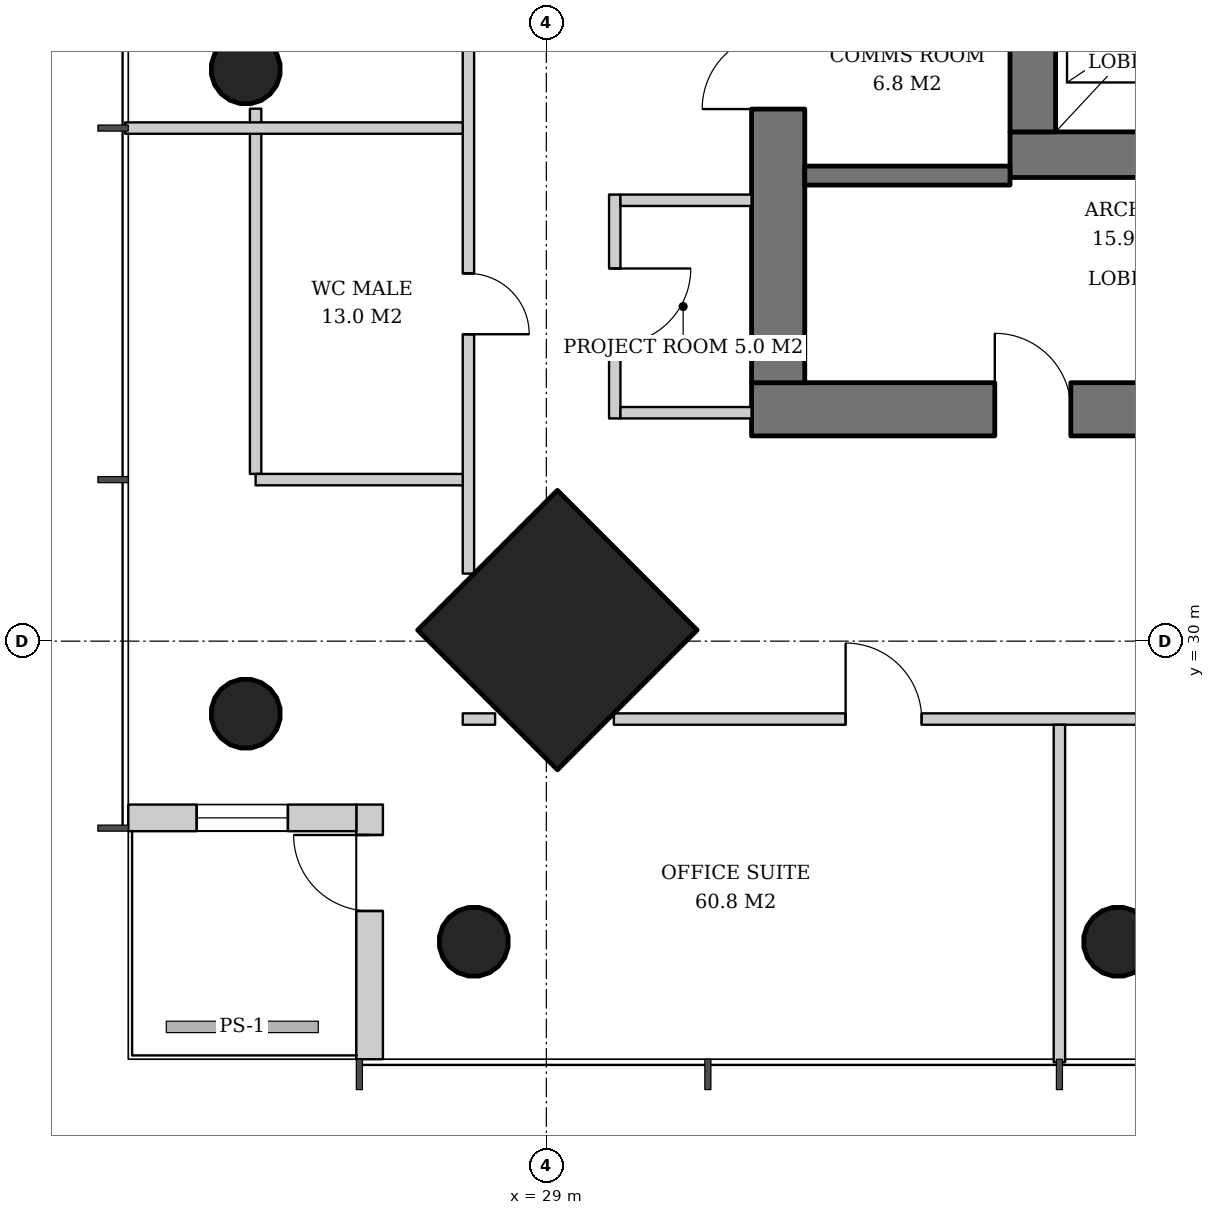
"""IFC4 building model, lengths in metres.
Left out: names, types, materials, properties, quantities, classifications, styles, units other than length and angle.
Written with IfcOpenShell. Run it as: python <this file> out.ifc"""

import sys

from ifc_helpers import new_model, si_unit, direction, frame, frame_2d, origin, origin_2d, place, context, subcontext, project, spatial, rectangle, hollow_circle, extrude, element, fill, save


model = new_model("IFC4")
c1 = context("Model", 3, precision=1e-05, world=origin(), true_north=direction((0.0, 1.0)))
c2 = subcontext(c1, "Body", "Model", "MODEL_VIEW")
j1 = project(units=[si_unit("LENGTHUNIT", "METRE"), si_unit("PLANEANGLEUNIT", "RADIAN")], contexts=[c1])
p1 = place(None, origin())
s1 = spatial("IfcSite", under=j1, at=p1, CompositionType="ELEMENT")
p2 = place(p1, origin())
s2 = spatial("IfcBuilding", under=s1, at=p2, CompositionType="ELEMENT")
p3 = place(p2, frame((0.0, 0.0, 146.4)))
s3 = spatial("IfcBuildingStorey", under=s2, at=p3, CompositionType="ELEMENT", Elevation=146.4)
p4 = place(p3, frame((29.107, 30.107, 0.0), z_axis=(0.031898107953, 0.031898107953, 0.998981992539), x_axis=(-0.707106781187, 0.707106781187, 0.0)))
e1 = element("IfcColumn", 1, at=p4, inside=s3, PredefinedType="COLUMN", context=c2, shape_type="SweptSolid", body=[
    extrude(rectangle(XDim=2.6, YDim=2.6, at=origin_2d()), origin(), (0.0, 0.0, 1.0), 3.804),
])
p5 = place(p3, frame((25.007, 29.007, 0.0), z_axis=(0.031962158256, 0.031962158256, 0.998977898093), x_axis=(-0.707106781187, 0.707106781187, 0.0)))
e2 = element("IfcColumn", 2, at=p5, inside=s3, PredefinedType="COLUMN", context=c2, shape_type="SweptSolid", body=[
    extrude(hollow_circle(Radius=0.457, WallThickness=0.03, at=origin_2d()), origin(), (0.0, 0.0, 1.0), 3.804),
])
p6 = place(p3, frame((25.007, 37.504, 0.0), z_axis=(0.031974442509, 0.015923015547, 0.999361842679), x_axis=(-0.445775033553, 0.895145027055, 0.0)))
e3 = element("IfcColumn", 3, at=p6, inside=s3, PredefinedType="COLUMN", context=c2, shape_type="SweptSolid", body=[
    extrude(hollow_circle(Radius=0.457, WallThickness=0.03, at=origin_2d()), origin(), (0.0, 0.0, 1.0), 3.802),
])
p7 = place(p3, frame((28.007, 26.007, 0.0), z_axis=(0.031962158256, 0.031962158256, 0.998977898093), x_axis=(-0.707106781187, 0.707106781187, 0.0)))
e4 = element("IfcColumn", 4, at=p7, inside=s3, PredefinedType="COLUMN", context=c2, shape_type="SweptSolid", body=[
    extrude(hollow_circle(Radius=0.457, WallThickness=0.03, at=origin_2d()), origin(), (0.0, 0.0, 1.0), 3.804),
])
p8 = place(p3, frame((36.504, 26.007, 0.0), z_axis=(0.015923015547, 0.031974442509, 0.999361842679), x_axis=(-0.895145027055, 0.445775033553, 0.0)))
e5 = element("IfcColumn", 5, at=p8, inside=s3, PredefinedType="COLUMN", context=c2, shape_type="SweptSolid", body=[
    extrude(hollow_circle(Radius=0.457, WallThickness=0.03, at=origin_2d()), origin(), (0.0, 0.0, 1.0), 3.802),
])
p9 = place(p3, frame((35.1, 36.4, 0.0), z_axis=(0.0, 0.0, 1.0), x_axis=(1.0, 0.0, 0.0)))
e6 = element("IfcWall", 6, at=p9, inside=s3, PredefinedType="SHEAR", context=c2, shape_type="SweptSolid", body=[
    extrude(rectangle(XDim=19.8, YDim=0.6, at=frame_2d((9.9, 0.0))), origin(), (0.0, 0.0, 1.0), 3.8),
])
p10 = place(p9, frame((3.9, 0.0, 0.0)))
e7 = element("IfcOpeningElement", 7, at=p10, cuts=e6, PredefinedType="OPENING", context=c2, shape_type="SweptSolid", body=[
    extrude(rectangle(XDim=1.0, YDim=2.1, at=frame_2d((0.5, 1.05))), frame((0.0, 0.31, 0.0), z_axis=(0.0, -1.0, 0.0), x_axis=(1.0, 0.0, 0.0)), (0.0, 0.0, 1.0), 0.62),
])
p11 = place(p9, frame((15.35, 0.0, 0.0)))
e8 = element("IfcOpeningElement", 8, at=p11, cuts=e6, PredefinedType="OPENING", context=c2, shape_type="SweptSolid", body=[
    extrude(rectangle(XDim=1.0, YDim=2.1, at=frame_2d((0.5, 1.05))), frame((0.0, 0.31, 0.0), z_axis=(0.0, -1.0, 0.0), x_axis=(1.0, 0.0, 0.0)), (0.0, 0.0, 1.0), 0.62),
])
p12 = place(p3, frame((35.4, 36.7, 0.0), z_axis=(0.0, 0.0, 1.0), x_axis=(0.0, 1.0, 0.0)))
e9 = element("IfcWall", 9, at=p12, inside=s3, PredefinedType="SHEAR", context=c2, shape_type="SweptSolid", body=[
    extrude(rectangle(XDim=18.6, YDim=0.6, at=frame_2d((9.3, 0.0))), origin(), (0.0, 0.0, 1.0), 3.8),
])
p13 = place(p12, frame((8.4, 0.0, 0.0)))
e10 = element("IfcOpeningElement", 10, at=p13, cuts=e9, PredefinedType="OPENING", context=c2, shape_type="SweptSolid", body=[
    extrude(rectangle(XDim=1.8, YDim=2.4, at=frame_2d((0.9, 1.2))), frame((0.0, 0.31, 0.0), z_axis=(0.0, -1.0, 0.0), x_axis=(1.0, 0.0, 0.0)), (0.0, 0.0, 1.0), 0.62),
])
p14 = place(p3, frame((31.7, 33.05, 0.0), z_axis=(0.0, 0.0, 1.0), x_axis=(1.0, 0.0, 0.0)))
e11 = element("IfcWall", 11, at=p14, inside=s3, PredefinedType="SHEAR", context=c2, shape_type="SweptSolid", body=[
    extrude(rectangle(XDim=26.6, YDim=0.7, at=frame_2d((13.3, 0.0))), origin(), (0.0, 0.0, 1.0), 3.8),
])
p15 = place(p14, frame((7.3, 0.0, 0.0)))
e12 = element("IfcOpeningElement", 12, at=p15, cuts=e11, PredefinedType="OPENING", context=c2, shape_type="SweptSolid", body=[
    extrude(rectangle(XDim=1.0, YDim=2.1, at=frame_2d((0.5, 1.05))), frame((0.0, 0.36, 0.0), z_axis=(0.0, -1.0, 0.0), x_axis=(1.0, 0.0, 0.0)), (0.0, 0.0, 1.0), 0.72),
])
p16 = place(p14, frame((18.75, 0.0, 0.0)))
e13 = element("IfcOpeningElement", 13, at=p16, cuts=e11, PredefinedType="OPENING", context=c2, shape_type="SweptSolid", body=[
    extrude(rectangle(XDim=1.0, YDim=2.1, at=frame_2d((0.5, 1.05))), frame((0.0, 0.36, 0.0), z_axis=(0.0, -1.0, 0.0), x_axis=(1.0, 0.0, 0.0)), (0.0, 0.0, 1.0), 0.72),
])
p17 = place(p14, frame((3.2, 0.0, 0.0)))
e14 = element("IfcOpeningElement", 14, at=p17, cuts=e11, PredefinedType="OPENING", context=c2, shape_type="SweptSolid", body=[
    extrude(rectangle(XDim=1.0, YDim=2.1, at=frame_2d((0.5, 1.05))), frame((0.0, 0.36, 0.0), z_axis=(0.0, -1.0, 0.0), x_axis=(1.0, 0.0, 0.0)), (0.0, 0.0, 1.0), 0.72),
])
p18 = place(p14, frame((10.42, 0.0, 0.0)))
e15 = element("IfcOpeningElement", 15, at=p18, cuts=e11, PredefinedType="OPENING", context=c2, shape_type="SweptSolid", body=[
    extrude(rectangle(XDim=1.0, YDim=2.1, at=frame_2d((0.5, 1.05))), frame((0.0, 0.36, 0.0), z_axis=(0.0, -1.0, 0.0), x_axis=(1.0, 0.0, 0.0)), (0.0, 0.0, 1.0), 0.72),
])
p19 = place(p14, frame((14.46, 0.0, 0.0)))
e16 = element("IfcOpeningElement", 16, at=p19, cuts=e11, PredefinedType="OPENING", context=c2, shape_type="SweptSolid", body=[
    extrude(rectangle(XDim=1.0, YDim=2.1, at=frame_2d((0.5, 1.05))), frame((0.0, 0.36, 0.0), z_axis=(0.0, -1.0, 0.0), x_axis=(1.0, 0.0, 0.0)), (0.0, 0.0, 1.0), 0.72),
])
p20 = place(p14, frame((22.5, 0.0, 0.0)))
e17 = element("IfcOpeningElement", 17, at=p20, cuts=e11, PredefinedType="OPENING", context=c2, shape_type="SweptSolid", body=[
    extrude(rectangle(XDim=1.0, YDim=2.1, at=frame_2d((0.5, 1.05))), frame((0.0, 0.36, 0.0), z_axis=(0.0, -1.0, 0.0), x_axis=(1.0, 0.0, 0.0)), (0.0, 0.0, 1.0), 0.72),
])
p21 = place(p3, frame((32.05, 33.4, 0.0), z_axis=(0.0, 0.0, 1.0), x_axis=(0.0, 1.0, 0.0)))
e18 = element("IfcWall", 18, at=p21, inside=s3, PredefinedType="SHEAR", context=c2, shape_type="SweptSolid", body=[
    extrude(rectangle(XDim=25.2, YDim=0.7, at=frame_2d((12.6, 0.0))), origin(), (0.0, 0.0, 1.0), 3.8),
])
p22 = place(p21, frame((11.7, 0.0, 0.0)))
e19 = element("IfcOpeningElement", 19, at=p22, cuts=e18, PredefinedType="OPENING", context=c2, shape_type="SweptSolid", body=[
    extrude(rectangle(XDim=1.8, YDim=2.4, at=frame_2d((0.9, 1.2))), frame((0.0, 0.36, 0.0), z_axis=(0.0, -1.0, 0.0), x_axis=(1.0, 0.0, 0.0)), (0.0, 0.0, 1.0), 0.72),
])
p23 = place(p21, frame((3.6, 0.0, 0.0)))
e20 = element("IfcOpeningElement", 20, at=p23, cuts=e18, PredefinedType="OPENING", context=c2, shape_type="SweptSolid", body=[
    extrude(rectangle(XDim=1.0, YDim=2.1, at=frame_2d((0.5, 1.05))), frame((0.0, 0.36, 0.0), z_axis=(0.0, -1.0, 0.0), x_axis=(1.0, 0.0, 0.0)), (0.0, 0.0, 1.0), 0.72),
])
p24 = place(p21, frame((6.35, 0.0, 0.0)))
e21 = element("IfcOpeningElement", 21, at=p24, cuts=e18, PredefinedType="OPENING", context=c2, shape_type="SweptSolid", body=[
    extrude(rectangle(XDim=1.0, YDim=2.1, at=frame_2d((0.5, 1.05))), frame((0.0, 0.36, 0.0), z_axis=(0.0, -1.0, 0.0), x_axis=(1.0, 0.0, 0.0)), (0.0, 0.0, 1.0), 0.72),
])
p25 = place(p21, frame((9.1, 0.0, 0.0)))
e22 = element("IfcOpeningElement", 22, at=p25, cuts=e18, PredefinedType="OPENING", context=c2, shape_type="SweptSolid", body=[
    extrude(rectangle(XDim=1.0, YDim=2.1, at=frame_2d((0.5, 1.05))), frame((0.0, 0.36, 0.0), z_axis=(0.0, -1.0, 0.0), x_axis=(1.0, 0.0, 0.0)), (0.0, 0.0, 1.0), 0.72),
])
p26 = place(p21, frame((15.1, 0.0, 0.0)))
e23 = element("IfcOpeningElement", 23, at=p26, cuts=e18, PredefinedType="OPENING", context=c2, shape_type="SweptSolid", body=[
    extrude(rectangle(XDim=1.0, YDim=2.1, at=frame_2d((0.5, 1.05))), frame((0.0, 0.36, 0.0), z_axis=(0.0, -1.0, 0.0), x_axis=(1.0, 0.0, 0.0)), (0.0, 0.0, 1.0), 0.72),
])
p27 = place(p21, frame((17.85, 0.0, 0.0)))
e24 = element("IfcOpeningElement", 24, at=p27, cuts=e18, PredefinedType="OPENING", context=c2, shape_type="SweptSolid", body=[
    extrude(rectangle(XDim=1.0, YDim=2.1, at=frame_2d((0.5, 1.05))), frame((0.0, 0.36, 0.0), z_axis=(0.0, -1.0, 0.0), x_axis=(1.0, 0.0, 0.0)), (0.0, 0.0, 1.0), 0.72),
])
p28 = place(p3, frame((26.675, 24.5, 0.0), z_axis=(0.0, 0.0, 1.0), x_axis=(0.0, 1.0, 0.0)))
e25 = element("IfcWall", 25, at=p28, inside=s3, PredefinedType="SOLIDWALL", context=c2, shape_type="SweptSolid", body=[
    extrude(rectangle(XDim=3.35, YDim=0.35, at=frame_2d((1.675, 0.0))), origin(), (0.0, 0.0, 1.0), 3.62),
])
p29 = place(p28, frame((1.95, 0.0, 0.0)))
e26 = element("IfcOpeningElement", 26, at=p29, cuts=e25, PredefinedType="OPENING", context=c2, shape_type="SweptSolid", body=[
    extrude(rectangle(XDim=1.0, YDim=2.4, at=frame_2d((0.5, 1.2))), frame((0.0, 0.185, 0.0), z_axis=(0.0, -1.0, 0.0), x_axis=(1.0, 0.0, 0.0)), (0.0, 0.0, 1.0), 0.37),
])
p30 = place(p3, frame((26.5, 27.675, 0.0), z_axis=(0.0, 0.0, 1.0), x_axis=(-1.0, 0.0, 0.0)))
e27 = element("IfcWall", 27, at=p30, inside=s3, PredefinedType="SOLIDWALL", context=c2, shape_type="SweptSolid", body=[
    extrude(rectangle(XDim=3.0, YDim=0.35, at=frame_2d((1.5, 0.0))), origin(), (0.0, 0.0, 1.0), 3.62),
])
p31 = place(p30, frame((0.9, 0.0, 0.6)))
e28 = element("IfcOpeningElement", 28, at=p31, cuts=e27, PredefinedType="OPENING", context=c2, shape_type="SweptSolid", body=[
    extrude(rectangle(XDim=1.2, YDim=2.55, at=frame_2d((0.6, 1.275))), frame((0.0, 0.185, 0.0), z_axis=(0.0, -1.0, 0.0), x_axis=(1.0, 0.0, 0.0)), (0.0, 0.0, 1.0), 0.37),
])
p32 = place(p3, frame((32.4, 36.125, 0.0), z_axis=(0.0, 0.0, 1.0), x_axis=(1.0, 0.0, 0.0)))
e29 = element("IfcWall", 29, at=p32, inside=s3, PredefinedType="SHEAR", context=c2, shape_type="SweptSolid", body=[
    extrude(rectangle(XDim=2.7, YDim=0.25, at=frame_2d((1.35, 0.0))), origin(), (0.0, 0.0, 1.0), 3.8),
])
p33 = place(p3, frame((29.9, 35.875, 0.0), z_axis=(0.0, 0.0, 1.0), x_axis=(0.0, -1.0, 0.0)))
e30 = element("IfcWall", 30, at=p33, inside=s3, PredefinedType="PARTITIONING", context=c2, shape_type="SweptSolid", body=[
    extrude(rectangle(XDim=2.945, YDim=0.15, at=frame_2d((1.473, 0.0))), origin(), (0.0, 0.0, 1.0), 2.806),
])
p34 = place(p33, frame((0.972, 0.0, 0.0)))
e31 = element("IfcOpeningElement", 31, at=p34, cuts=e30, PredefinedType="OPENING", context=c2, shape_type="SweptSolid", body=[
    extrude(rectangle(XDim=1.0, YDim=2.1, at=frame_2d((0.5, 1.05))), frame((0.0, 0.085, 0.0), z_axis=(0.0, -1.0, 0.0), x_axis=(1.0, 0.0, 0.0)), (0.0, 0.0, 1.0), 0.17),
])
for number, where, z_axis, x_axis in (
    (32, (31.7, 35.8, 0.0), (0.0, 0.0, 1.0), (-1.0, 0.0, 0.0)),
    (33, (31.7, 33.005, 0.0), (0.0, 0.0, 1.0), (-1.0, 0.0, 0.0)),
):
    element("IfcWall", number, at=place(p3, frame(where, z_axis=z_axis, x_axis=x_axis)), inside=s3, PredefinedType="PARTITIONING", context=c2, shape_type="SweptSolid", body=[
        extrude(rectangle(XDim=1.725, YDim=0.15, at=frame_2d((0.862, 0.0))), origin(), (0.0, 0.0, 1.0), 3.62),
    ])
p35 = place(p3, frame((25.175, 37.005, 0.0), z_axis=(0.0, 0.0, 1.0), x_axis=(0.0, -1.0, 0.0)))
e34 = element("IfcWall", 34, at=p35, inside=s3, PredefinedType="PARTITIONING", context=c2, shape_type="SweptSolid", body=[
    extrude(rectangle(XDim=4.805, YDim=0.15, at=frame_2d((2.402, 0.0))), origin(), (0.0, 0.0, 1.0), 2.806),
])
p36 = place(p3, frame((27.975, 61.112, 0.0), z_axis=(0.0, 0.0, 1.0), x_axis=(0.0, -1.0, 0.0)))
e35 = element("IfcWall", 35, at=p36, inside=s3, PredefinedType="PARTITIONING", context=c2, shape_type="SweptSolid", body=[
    extrude(rectangle(XDim=30.223, YDim=0.15, at=frame_2d((15.112, 0.0))), origin(), (0.0, 0.0, 1.0), 2.72),
])
p37 = place(p36, frame((3.049, 0.0, 0.0)))
e36 = element("IfcOpeningElement", 36, at=p37, cuts=e35, PredefinedType="OPENING", context=c2, shape_type="SweptSolid", body=[
    extrude(rectangle(XDim=1.0, YDim=2.1, at=frame_2d((0.5, 1.05))), frame((0.0, 0.085, 0.0), z_axis=(0.0, -1.0, 0.0), x_axis=(1.0, 0.0, 0.0)), (0.0, 0.0, 1.0), 0.17),
])
p38 = place(p36, frame((7.674, 0.0, 0.0)))
e37 = element("IfcOpeningElement", 37, at=p38, cuts=e35, PredefinedType="OPENING", context=c2, shape_type="SweptSolid", body=[
    extrude(rectangle(XDim=1.0, YDim=2.1, at=frame_2d((0.5, 1.05))), frame((0.0, 0.085, 0.0), z_axis=(0.0, -1.0, 0.0), x_axis=(1.0, 0.0, 0.0)), (0.0, 0.0, 1.0), 0.17),
])
p39 = place(p36, frame((12.299, 0.0, 0.0)))
e38 = element("IfcOpeningElement", 38, at=p39, cuts=e35, PredefinedType="OPENING", context=c2, shape_type="SweptSolid", body=[
    extrude(rectangle(XDim=1.0, YDim=2.1, at=frame_2d((0.5, 1.05))), frame((0.0, 0.085, 0.0), z_axis=(0.0, -1.0, 0.0), x_axis=(1.0, 0.0, 0.0)), (0.0, 0.0, 1.0), 0.17),
])
p40 = place(p36, frame((17.024, 0.0, 0.0)))
e39 = element("IfcOpeningElement", 39, at=p40, cuts=e35, PredefinedType="OPENING", context=c2, shape_type="SweptSolid", body=[
    extrude(rectangle(XDim=0.8, YDim=2.1, at=frame_2d((0.4, 1.05))), frame((0.0, 0.085, 0.0), z_axis=(0.0, -1.0, 0.0), x_axis=(1.0, 0.0, 0.0)), (0.0, 0.0, 1.0), 0.17),
])
p41 = place(p36, frame((21.549, 0.0, 0.0)))
e40 = element("IfcOpeningElement", 40, at=p41, cuts=e35, PredefinedType="OPENING", context=c2, shape_type="SweptSolid", body=[
    extrude(rectangle(XDim=1.0, YDim=2.1, at=frame_2d((0.5, 1.05))), frame((0.0, 0.085, 0.0), z_axis=(0.0, -1.0, 0.0), x_axis=(1.0, 0.0, 0.0)), (0.0, 0.0, 1.0), 0.17),
])
p42 = place(p36, frame((26.274, 0.0, 0.0)))
e41 = element("IfcOpeningElement", 41, at=p42, cuts=e35, PredefinedType="OPENING", context=c2, shape_type="SweptSolid", body=[
    extrude(rectangle(XDim=0.8, YDim=2.1, at=frame_2d((0.4, 1.05))), frame((0.0, 0.085, 0.0), z_axis=(0.0, -1.0, 0.0), x_axis=(1.0, 0.0, 0.0)), (0.0, 0.0, 1.0), 0.17),
])
p43 = place(p3, frame((27.9, 36.75, 0.0), z_axis=(0.0, 0.0, 1.0), x_axis=(-1.0, 0.0, 0.0)))
e42 = element("IfcWall", 42, at=p43, inside=s3, PredefinedType="PARTITIONING", context=c2, shape_type="SweptSolid", body=[
    extrude(rectangle(XDim=4.44, YDim=0.15, at=frame_2d((2.22, 0.0))), origin(), (0.0, 0.0, 1.0), 2.82),
])
p44 = place(p3, frame((27.9, 32.125, 0.0), z_axis=(0.0, 0.0, 1.0), x_axis=(-1.0, 0.0, 0.0)))
e43 = element("IfcWall", 43, at=p44, inside=s3, PredefinedType="PARTITIONING", context=c2, shape_type="SweptSolid", body=[
    extrude(rectangle(XDim=2.725, YDim=0.15, at=frame_2d((1.362, 0.0))), origin(), (0.0, 0.0, 1.0), 2.82),
])
p45 = place(p3, frame((27.9, 28.975, 0.0), z_axis=(0.0, 0.0, 1.0), x_axis=(1.0, 0.0, 0.0)))
e44 = element("IfcWall", 44, at=p45, inside=s3, PredefinedType="PARTITIONING", context=c2, shape_type="SweptSolid", body=[
    extrude(rectangle(XDim=0.426, YDim=0.15, at=frame_2d((0.213, 0.0))), origin(), (0.0, 0.0, 1.0), 3.32),
])
p46 = place(p3, frame((29.888, 28.975, 0.0), z_axis=(0.0, 0.0, 1.0), x_axis=(1.0, 0.0, 0.0)))
e45 = element("IfcWall", 45, at=p46, inside=s3, PredefinedType="PARTITIONING", context=c2, shape_type="SweptSolid", body=[
    extrude(rectangle(XDim=30.223, YDim=0.15, at=frame_2d((15.112, 0.0))), origin(), (0.0, 0.0, 1.0), 2.72),
])
p47 = place(p46, frame((3.049, 0.0, 0.0)))
e46 = element("IfcOpeningElement", 46, at=p47, cuts=e45, PredefinedType="OPENING", context=c2, shape_type="SweptSolid", body=[
    extrude(rectangle(XDim=1.0, YDim=2.1, at=frame_2d((0.5, 1.05))), frame((0.0, 0.085, 0.0), z_axis=(0.0, -1.0, 0.0), x_axis=(1.0, 0.0, 0.0)), (0.0, 0.0, 1.0), 0.17),
])
p48 = place(p46, frame((7.674, 0.0, 0.0)))
e47 = element("IfcOpeningElement", 47, at=p48, cuts=e45, PredefinedType="OPENING", context=c2, shape_type="SweptSolid", body=[
    extrude(rectangle(XDim=1.0, YDim=2.1, at=frame_2d((0.5, 1.05))), frame((0.0, 0.085, 0.0), z_axis=(0.0, -1.0, 0.0), x_axis=(1.0, 0.0, 0.0)), (0.0, 0.0, 1.0), 0.17),
])
p49 = place(p46, frame((16.924, 0.0, 0.0)))
e48 = element("IfcOpeningElement", 48, at=p49, cuts=e45, PredefinedType="OPENING", context=c2, shape_type="SweptSolid", body=[
    extrude(rectangle(XDim=1.0, YDim=2.1, at=frame_2d((0.5, 1.05))), frame((0.0, 0.085, 0.0), z_axis=(0.0, -1.0, 0.0), x_axis=(1.0, 0.0, 0.0)), (0.0, 0.0, 1.0), 0.17),
])
p50 = place(p46, frame((26.174, 0.0, 0.0)))
e49 = element("IfcOpeningElement", 49, at=p50, cuts=e45, PredefinedType="OPENING", context=c2, shape_type="SweptSolid", body=[
    extrude(rectangle(XDim=1.0, YDim=2.1, at=frame_2d((0.5, 1.05))), frame((0.0, 0.085, 0.0), z_axis=(0.0, -1.0, 0.0), x_axis=(1.0, 0.0, 0.0)), (0.0, 0.0, 1.0), 0.17),
])
p51 = place(p3, frame((35.75, 28.9, 0.0), z_axis=(0.0, 0.0, 1.0), x_axis=(0.0, -1.0, 0.0)))
e50 = element("IfcWall", 50, at=p51, inside=s3, PredefinedType="PARTITIONING", context=c2, shape_type="SweptSolid", body=[
    extrude(rectangle(XDim=4.44, YDim=0.15, at=frame_2d((2.22, 0.0))), origin(), (0.0, 0.0, 1.0), 2.82),
])
p52 = place(p29, origin())
e51 = element("IfcDoor", 51, at=p52, inside=s3, OperationType="SINGLE_SWING_RIGHT", PredefinedType="DOOR", context=c2, shape_type="SweptSolid", body=[
    extrude(rectangle(XDim=1.0, YDim=2.4, at=frame_2d((0.5, 1.2))), frame((0.0, 0.025, 0.0), z_axis=(0.0, -1.0, 0.0), x_axis=(1.0, 0.0, 0.0)), (0.0, 0.0, 1.0), 0.05),
])
fill(e26, e51)
p53 = place(p31, origin())
e52 = element("IfcWindow", 52, at=p53, inside=s3, PartitioningType="SINGLE_PANEL", PredefinedType="WINDOW", context=c2, shape_type="SweptSolid", body=[
    extrude(rectangle(XDim=1.2, YDim=2.55, at=frame_2d((0.6, 1.275))), frame((0.0, 0.03, 0.0), z_axis=(0.0, -1.0, 0.0), x_axis=(1.0, 0.0, 0.0)), (0.0, 0.0, 1.0), 0.06),
])
fill(e28, e52)
p54 = place(p23, origin())
e53 = element("IfcDoor", 53, at=p54, inside=s3, OperationType="SINGLE_SWING_LEFT", PredefinedType="DOOR", context=c2, shape_type="SweptSolid", body=[
    extrude(rectangle(XDim=1.0, YDim=2.1, at=frame_2d((0.5, 1.05))), frame((0.0, -0.29, 0.0), z_axis=(0.0, -1.0, 0.0), x_axis=(1.0, 0.0, 0.0)), (0.0, 0.0, 1.0), 0.05),
])
fill(e20, e53)
p55 = place(p17, origin())
e54 = element("IfcDoor", 54, at=p55, inside=s3, OperationType="SINGLE_SWING_LEFT", PredefinedType="DOOR", context=c2, shape_type="SweptSolid", body=[
    extrude(rectangle(XDim=1.0, YDim=2.1, at=frame_2d((0.5, 1.05))), frame((0.0, 0.34, 0.0), z_axis=(0.0, -1.0, 0.0), x_axis=(1.0, 0.0, 0.0)), (0.0, 0.0, 1.0), 0.05),
])
fill(e14, e54)
p56 = place(p34, origin())
e55 = element("IfcDoor", 55, at=p56, inside=s3, OperationType="SINGLE_SWING_LEFT", PredefinedType="DOOR", context=c2, shape_type="SweptSolid", body=[
    extrude(rectangle(XDim=1.0, YDim=2.1, at=frame_2d((0.5, 1.05))), frame((0.0, 0.025, 0.0), z_axis=(0.0, -1.0, 0.0), x_axis=(1.0, 0.0, 0.0)), (0.0, 0.0, 1.0), 0.05),
])
fill(e31, e55)
p57 = place(p42, origin())
e56 = element("IfcDoor", 56, at=p57, inside=s3, OperationType="SINGLE_SWING_RIGHT", PredefinedType="DOOR", context=c2, shape_type="SweptSolid", body=[
    extrude(rectangle(XDim=0.8, YDim=2.1, at=frame_2d((0.4, 1.05))), frame((0.0, 0.025, 0.0), z_axis=(0.0, -1.0, 0.0), x_axis=(1.0, 0.0, 0.0)), (0.0, 0.0, 1.0), 0.05),
])
fill(e41, e56)
p58 = place(p47, origin())
e57 = element("IfcDoor", 57, at=p58, inside=s3, OperationType="SINGLE_SWING_LEFT", PredefinedType="DOOR", context=c2, shape_type="SweptSolid", body=[
    extrude(rectangle(XDim=1.0, YDim=2.1, at=frame_2d((0.5, 1.05))), frame((0.0, 0.025, 0.0), z_axis=(0.0, -1.0, 0.0), x_axis=(1.0, 0.0, 0.0)), (0.0, 0.0, 1.0), 0.05),
])
fill(e46, e57)
save(model, sys.argv[1])
